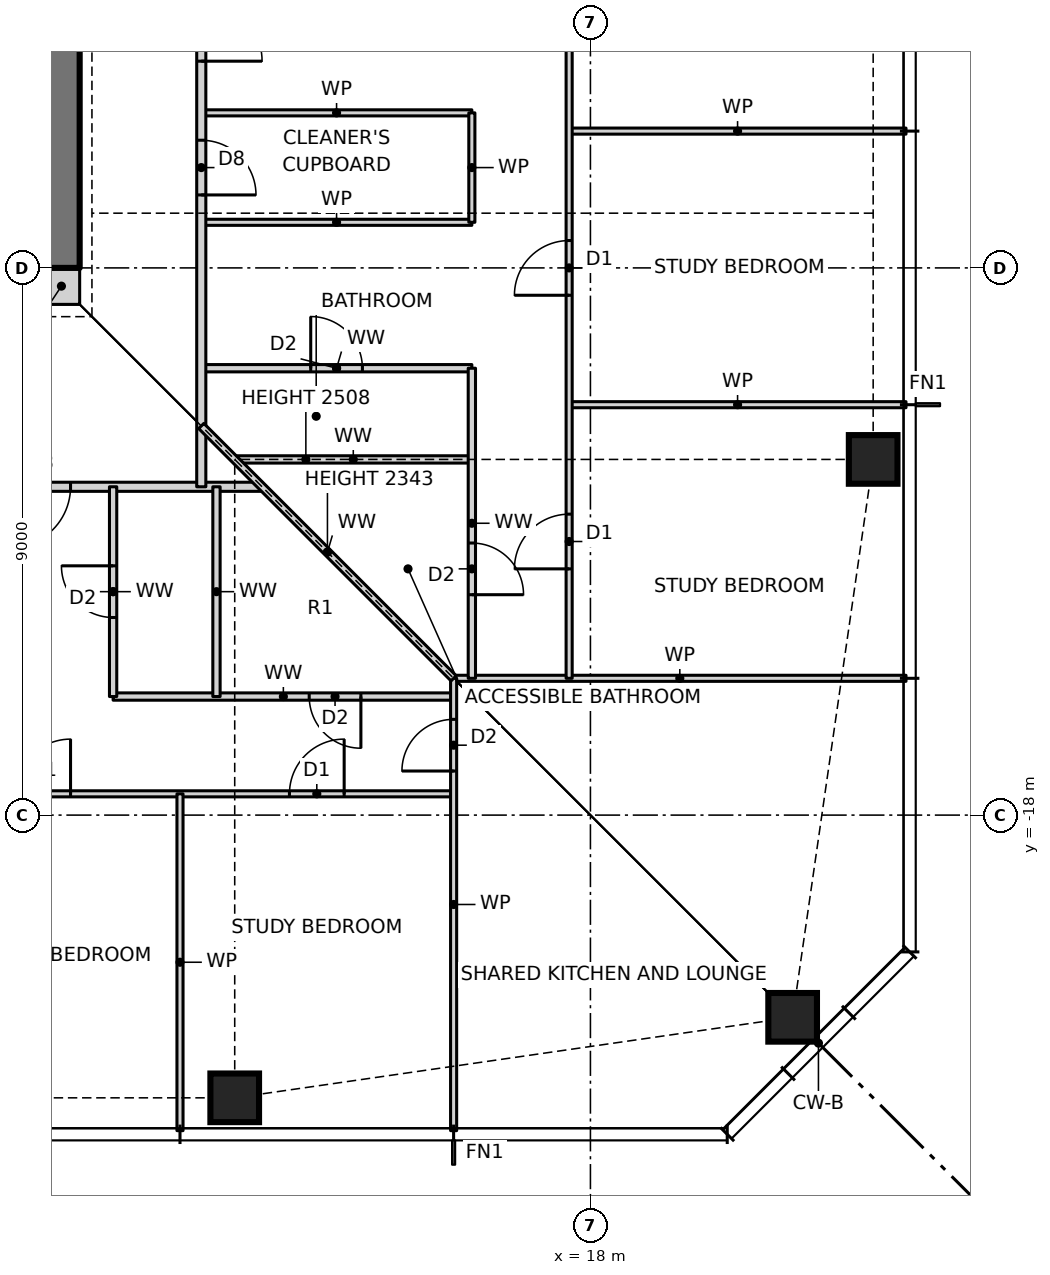
"""IFC4 building model, lengths in metres.
Left out: names, types, materials, properties, quantities, classifications, styles, units other than length and angle.
Written with IfcOpenShell. Run it as: python <this file> out.ifc"""

import sys

from ifc_helpers import new_model, si_unit, direction, frame, frame_2d, origin, origin_2d, place, context, subcontext, project, spatial, rectangle, hollow_rectangle, extrude, element, fill, save


model = new_model("IFC4")
c1 = context("Model", 3, precision=1e-05, world=origin(), true_north=direction((0.0, 1.0)))
c2 = subcontext(c1, "Body", "Model", "MODEL_VIEW")
j1 = project(units=[si_unit("LENGTHUNIT", "METRE"), si_unit("PLANEANGLEUNIT", "RADIAN")], contexts=[c1])
p1 = place(None, origin())
s1 = spatial("IfcSite", under=j1, at=p1, CompositionType="ELEMENT")
p2 = place(p1, origin())
s2 = spatial("IfcBuilding", under=s1, at=p2, CompositionType="ELEMENT")
p3 = place(p2, frame((0.0, 0.0, 22.0)))
s3 = spatial("IfcBuildingStorey", under=s2, at=p3, CompositionType="ELEMENT", Elevation=22.0)
for number, where, z_axis, x_axis in (
    (1, (12.15, -22.65, 0.0), (0.0, 0.0, 1.0), (1.0, 0.0, 0.0)),
    (2, (21.326, -21.326, 0.0), (0.0, 0.0, 1.0), (1.0, 0.0, 0.0)),
    (3, (22.65, -12.15, 0.0), (0.0, 0.0, 1.0), (1.0, 0.0, 0.0)),
):
    element("IfcColumn", number, at=place(p3, frame(where, z_axis=z_axis, x_axis=x_axis)), inside=s3, PredefinedType="COLUMN", context=c2, shape_type="SweptSolid", body=[
        extrude(hollow_rectangle(XDim=0.8, YDim=0.8, WallThickness=0.09, at=origin_2d()), origin(), (0.0, 0.0, 1.0), 3.5),
    ])
p4 = place(p3, frame((9.0, -9.3, 0.0), z_axis=(0.0, 0.0, 1.0), x_axis=(1.0, 0.0, 0.0)))
e4 = element("IfcWall", 4, at=p4, inside=s3, PredefinedType="SOLIDWALL", context=c2, shape_type="SweptSolid", body=[
    extrude(rectangle(XDim=0.6, YDim=0.6, at=frame_2d((0.3, 0.0))), origin(), (0.0, 0.0, 1.0), 3.5),
])
p5 = place(p3, frame((9.0, -9.0, 0.0), z_axis=(0.0, 0.0, 1.0), x_axis=(0.0, 1.0, 0.0)))
e5 = element("IfcWall", 5, at=p5, inside=s3, PredefinedType="SHEAR", context=c2, shape_type="SweptSolid", body=[
    extrude(rectangle(XDim=18.0, YDim=1.2, at=frame_2d((9.0, 0.0))), origin(), (0.0, 0.0, 1.0), 3.5),
])
p6 = place(p5, frame((8.5, 0.0, 0.0)))
e6 = element("IfcOpeningElement", 6, at=p6, cuts=e5, PredefinedType="OPENING", context=c2, shape_type="SweptSolid", body=[
    extrude(rectangle(XDim=1.0, YDim=2.1, at=frame_2d((0.5, 1.05))), frame((0.0, 0.61, 0.0), z_axis=(0.0, -1.0, 0.0), x_axis=(1.0, 0.0, 0.0)), (0.0, 0.0, 1.0), 1.22),
])
p7 = place(p3, frame((-15.75, -17.65, 0.0), z_axis=(0.0, 0.0, 1.0), x_axis=(1.0, 0.0, 0.0)))
e7 = element("IfcWall", 7, at=p7, inside=s3, PredefinedType="PARTITIONING", context=c2, shape_type="SweptSolid", body=[
    extrude(rectangle(XDim=31.5, YDim=0.1, at=frame_2d((15.75, 0.0))), origin(), (0.0, 0.0, 1.0), 3.27),
])
p8 = place(p7, frame((1.8, 0.0, 0.0)))
e8 = element("IfcOpeningElement", 8, at=p8, cuts=e7, PredefinedType="OPENING", context=c2, shape_type="SweptSolid", body=[
    extrude(rectangle(XDim=0.9, YDim=2.1, at=frame_2d((0.45, 1.05))), frame((0.0, 0.06, 0.0), z_axis=(0.0, -1.0, 0.0), x_axis=(1.0, 0.0, 0.0)), (0.0, 0.0, 1.0), 0.12),
])
p9 = place(p7, frame((6.3, 0.0, 0.0)))
e9 = element("IfcOpeningElement", 9, at=p9, cuts=e7, PredefinedType="OPENING", context=c2, shape_type="SweptSolid", body=[
    extrude(rectangle(XDim=0.9, YDim=2.1, at=frame_2d((0.45, 1.05))), frame((0.0, 0.06, 0.0), z_axis=(0.0, -1.0, 0.0), x_axis=(1.0, 0.0, 0.0)), (0.0, 0.0, 1.0), 0.12),
])
p10 = place(p7, frame((10.8, 0.0, 0.0)))
e10 = element("IfcOpeningElement", 10, at=p10, cuts=e7, PredefinedType="OPENING", context=c2, shape_type="SweptSolid", body=[
    extrude(rectangle(XDim=0.9, YDim=2.1, at=frame_2d((0.45, 1.05))), frame((0.0, 0.06, 0.0), z_axis=(0.0, -1.0, 0.0), x_axis=(1.0, 0.0, 0.0)), (0.0, 0.0, 1.0), 0.12),
])
p11 = place(p7, frame((15.3, 0.0, 0.0)))
e11 = element("IfcOpeningElement", 11, at=p11, cuts=e7, PredefinedType="OPENING", context=c2, shape_type="SweptSolid", body=[
    extrude(rectangle(XDim=0.9, YDim=2.1, at=frame_2d((0.45, 1.05))), frame((0.0, 0.06, 0.0), z_axis=(0.0, -1.0, 0.0), x_axis=(1.0, 0.0, 0.0)), (0.0, 0.0, 1.0), 0.12),
])
p12 = place(p7, frame((19.8, 0.0, 0.0)))
e12 = element("IfcOpeningElement", 12, at=p12, cuts=e7, PredefinedType="OPENING", context=c2, shape_type="SweptSolid", body=[
    extrude(rectangle(XDim=0.9, YDim=2.1, at=frame_2d((0.45, 1.05))), frame((0.0, 0.06, 0.0), z_axis=(0.0, -1.0, 0.0), x_axis=(1.0, 0.0, 0.0)), (0.0, 0.0, 1.0), 0.12),
])
p13 = place(p7, frame((24.3, 0.0, 0.0)))
e13 = element("IfcOpeningElement", 13, at=p13, cuts=e7, PredefinedType="OPENING", context=c2, shape_type="SweptSolid", body=[
    extrude(rectangle(XDim=0.9, YDim=2.1, at=frame_2d((0.45, 1.05))), frame((0.0, 0.06, 0.0), z_axis=(0.0, -1.0, 0.0), x_axis=(1.0, 0.0, 0.0)), (0.0, 0.0, 1.0), 0.12),
])
p14 = place(p7, frame((28.8, 0.0, 0.0)))
e14 = element("IfcOpeningElement", 14, at=p14, cuts=e7, PredefinedType="OPENING", context=c2, shape_type="SweptSolid", body=[
    extrude(rectangle(XDim=0.9, YDim=2.1, at=frame_2d((0.45, 1.05))), frame((0.0, 0.06, 0.0), z_axis=(0.0, -1.0, 0.0), x_axis=(1.0, 0.0, 0.0)), (0.0, 0.0, 1.0), 0.12),
])
p15 = place(p3, frame((10.15, -16.05, 0.0), z_axis=(0.0, 0.0, 1.0), x_axis=(1.0, 0.0, 0.0)))
e15 = element("IfcWall", 15, at=p15, inside=s3, PredefinedType="PARTITIONING", context=c2, shape_type="SweptSolid", body=[
    extrude(rectangle(XDim=5.6, YDim=0.12, at=frame_2d((2.8, 0.0))), origin(), (0.0, 0.0, 1.0), 3.27),
])
p16 = place(p15, frame((3.225, 0.0, 0.0)))
e16 = element("IfcOpeningElement", 16, at=p16, cuts=e15, PredefinedType="OPENING", context=c2, shape_type="SweptSolid", body=[
    extrude(rectangle(XDim=0.85, YDim=2.1, at=frame_2d((0.425, 1.05))), frame((0.0, 0.07, 0.0), z_axis=(0.0, -1.0, 0.0), x_axis=(1.0, 0.0, 0.0)), (0.0, 0.0, 1.0), 0.14),
])
p17 = place(p3, frame((15.75, -15.75, 0.0), z_axis=(0.0, 0.0, 1.0), x_axis=(1.0, 0.0, 0.0)))
e17 = element("IfcWall", 17, at=p17, inside=s3, PredefinedType="PARTITIONING", context=c2, shape_type="SweptSolid", body=[
    extrude(rectangle(XDim=7.44, YDim=0.1, at=frame_2d((3.72, 0.0))), origin(), (0.0, 0.0, 1.0), 3.27),
])
p18 = place(p3, frame((-12.6, -12.6, 0.0), z_axis=(0.0, 0.0, 1.0), x_axis=(1.0, 0.0, 0.0)))
e18 = element("IfcWall", 18, at=p18, inside=s3, PredefinedType="PARTITIONING", context=c2, shape_type="SweptSolid", body=[
    extrude(rectangle(XDim=25.2, YDim=0.15, at=frame_2d((12.6, 0.0))), origin(), (0.0, 0.0, 1.0), 3.27),
])
p19 = place(p18, frame((21.05, 0.0, 0.0)))
e19 = element("IfcOpeningElement", 19, at=p19, cuts=e18, PredefinedType="OPENING", context=c2, shape_type="SweptSolid", body=[
    extrude(rectangle(XDim=1.0, YDim=2.1, at=frame_2d((0.5, 1.05))), frame((0.0, 0.085, 0.0), z_axis=(0.0, -1.0, 0.0), x_axis=(1.0, 0.0, 0.0)), (0.0, 0.0, 1.0), 0.17),
])
p20 = place(p3, frame((12.15, -12.15, 0.0), z_axis=(0.0, 0.0, 1.0), x_axis=(1.0, 0.0, 0.0)))
e20 = element("IfcWall", 20, at=p20, inside=s3, PredefinedType="PARTITIONING", context=c2, shape_type="SweptSolid", body=[
    extrude(rectangle(XDim=3.9, YDim=0.12, at=frame_2d((1.95, 0.0))), origin(), (0.0, 0.0, 1.0), 2.508),
])
p21 = place(p3, frame((17.65, -11.25, 0.0), z_axis=(0.0, 0.0, 1.0), x_axis=(1.0, 0.0, 0.0)))
e21 = element("IfcWall", 21, at=p21, inside=s3, PredefinedType="PARTITIONING", context=c2, shape_type="SweptSolid", body=[
    extrude(rectangle(XDim=5.54, YDim=0.1, at=frame_2d((2.77, 0.0))), origin(), (0.0, 0.0, 1.0), 3.27),
])
p22 = place(p3, frame((11.6, -10.65, 0.0), z_axis=(0.0, 0.0, 1.0), x_axis=(1.0, 0.0, 0.0)))
e22 = element("IfcWall", 22, at=p22, inside=s3, PredefinedType="PARTITIONING", context=c2, shape_type="SweptSolid", body=[
    extrude(rectangle(XDim=4.45, YDim=0.12, at=frame_2d((2.225, 0.0))), origin(), (0.0, 0.0, 1.0), 3.27),
])
p23 = place(p22, frame((1.8, 0.0, 0.0)))
e23 = element("IfcOpeningElement", 23, at=p23, cuts=e22, PredefinedType="OPENING", context=c2, shape_type="SweptSolid", body=[
    extrude(rectangle(XDim=0.85, YDim=2.1, at=frame_2d((0.425, 1.05))), frame((0.0, 0.07, 0.0), z_axis=(0.0, -1.0, 0.0), x_axis=(1.0, 0.0, 0.0)), (0.0, 0.0, 1.0), 0.14),
])
p24 = place(p3, frame((11.6, -8.25, 0.0), z_axis=(0.0, 0.0, 1.0), x_axis=(1.0, 0.0, 0.0)))
e24 = element("IfcWall", 24, at=p24, inside=s3, PredefinedType="PARTITIONING", context=c2, shape_type="SweptSolid", body=[
    extrude(rectangle(XDim=4.45, YDim=0.1, at=frame_2d((2.225, 0.0))), origin(), (0.0, 0.0, 1.0), 3.27),
])
p25 = place(p3, frame((17.65, -6.75, 0.0), z_axis=(0.0, 0.0, 1.0), x_axis=(1.0, 0.0, 0.0)))
e25 = element("IfcWall", 25, at=p25, inside=s3, PredefinedType="PARTITIONING", context=c2, shape_type="SweptSolid", body=[
    extrude(rectangle(XDim=5.54, YDim=0.1, at=frame_2d((2.77, 0.0))), origin(), (0.0, 0.0, 1.0), 3.27),
])
p26 = place(p3, frame((11.6, -6.45, 0.0), z_axis=(0.0, 0.0, 1.0), x_axis=(1.0, 0.0, 0.0)))
e26 = element("IfcWall", 26, at=p26, inside=s3, PredefinedType="PARTITIONING", context=c2, shape_type="SweptSolid", body=[
    extrude(rectangle(XDim=4.45, YDim=0.1, at=frame_2d((2.225, 0.0))), origin(), (0.0, 0.0, 1.0), 3.27),
])
p27 = place(p3, frame((17.65, -15.75, 0.0), z_axis=(0.0, 0.0, 1.0), x_axis=(0.0, 1.0, 0.0)))
e27 = element("IfcWall", 27, at=p27, inside=s3, PredefinedType="PARTITIONING", context=c2, shape_type="SweptSolid", body=[
    extrude(rectangle(XDim=31.5, YDim=0.1, at=frame_2d((15.75, 0.0))), origin(), (0.0, 0.0, 1.0), 3.27),
])
p28 = place(p27, frame((1.8, 0.0, 0.0)))
e28 = element("IfcOpeningElement", 28, at=p28, cuts=e27, PredefinedType="OPENING", context=c2, shape_type="SweptSolid", body=[
    extrude(rectangle(XDim=0.9, YDim=2.1, at=frame_2d((0.45, 1.05))), frame((0.0, 0.06, 0.0), z_axis=(0.0, -1.0, 0.0), x_axis=(1.0, 0.0, 0.0)), (0.0, 0.0, 1.0), 0.12),
])
p29 = place(p27, frame((6.3, 0.0, 0.0)))
e29 = element("IfcOpeningElement", 29, at=p29, cuts=e27, PredefinedType="OPENING", context=c2, shape_type="SweptSolid", body=[
    extrude(rectangle(XDim=0.9, YDim=2.1, at=frame_2d((0.45, 1.05))), frame((0.0, 0.06, 0.0), z_axis=(0.0, -1.0, 0.0), x_axis=(1.0, 0.0, 0.0)), (0.0, 0.0, 1.0), 0.12),
])
p30 = place(p27, frame((10.8, 0.0, 0.0)))
e30 = element("IfcOpeningElement", 30, at=p30, cuts=e27, PredefinedType="OPENING", context=c2, shape_type="SweptSolid", body=[
    extrude(rectangle(XDim=0.9, YDim=2.1, at=frame_2d((0.45, 1.05))), frame((0.0, 0.06, 0.0), z_axis=(0.0, -1.0, 0.0), x_axis=(1.0, 0.0, 0.0)), (0.0, 0.0, 1.0), 0.12),
])
p31 = place(p27, frame((15.3, 0.0, 0.0)))
e31 = element("IfcOpeningElement", 31, at=p31, cuts=e27, PredefinedType="OPENING", context=c2, shape_type="SweptSolid", body=[
    extrude(rectangle(XDim=0.9, YDim=2.1, at=frame_2d((0.45, 1.05))), frame((0.0, 0.06, 0.0), z_axis=(0.0, -1.0, 0.0), x_axis=(1.0, 0.0, 0.0)), (0.0, 0.0, 1.0), 0.12),
])
p32 = place(p27, frame((19.8, 0.0, 0.0)))
e32 = element("IfcOpeningElement", 32, at=p32, cuts=e27, PredefinedType="OPENING", context=c2, shape_type="SweptSolid", body=[
    extrude(rectangle(XDim=0.9, YDim=2.1, at=frame_2d((0.45, 1.05))), frame((0.0, 0.06, 0.0), z_axis=(0.0, -1.0, 0.0), x_axis=(1.0, 0.0, 0.0)), (0.0, 0.0, 1.0), 0.12),
])
p33 = place(p27, frame((24.3, 0.0, 0.0)))
e33 = element("IfcOpeningElement", 33, at=p33, cuts=e27, PredefinedType="OPENING", context=c2, shape_type="SweptSolid", body=[
    extrude(rectangle(XDim=0.9, YDim=2.1, at=frame_2d((0.45, 1.05))), frame((0.0, 0.06, 0.0), z_axis=(0.0, -1.0, 0.0), x_axis=(1.0, 0.0, 0.0)), (0.0, 0.0, 1.0), 0.12),
])
p34 = place(p27, frame((28.8, 0.0, 0.0)))
e34 = element("IfcOpeningElement", 34, at=p34, cuts=e27, PredefinedType="OPENING", context=c2, shape_type="SweptSolid", body=[
    extrude(rectangle(XDim=0.9, YDim=2.1, at=frame_2d((0.45, 1.05))), frame((0.0, 0.06, 0.0), z_axis=(0.0, -1.0, 0.0), x_axis=(1.0, 0.0, 0.0)), (0.0, 0.0, 1.0), 0.12),
])
p35 = place(p3, frame((16.05, -15.75, 0.0), z_axis=(0.0, 0.0, 1.0), x_axis=(0.0, 1.0, 0.0)))
e35 = element("IfcWall", 35, at=p35, inside=s3, PredefinedType="PARTITIONING", context=c2, shape_type="SweptSolid", body=[
    extrude(rectangle(XDim=5.1, YDim=0.12, at=frame_2d((2.55, 0.0))), origin(), (0.0, 0.0, 1.0), 3.27),
])
p36 = place(p35, frame((1.375, 0.0, 0.0)))
e36 = element("IfcOpeningElement", 36, at=p36, cuts=e35, PredefinedType="OPENING", context=c2, shape_type="SweptSolid", body=[
    extrude(rectangle(XDim=0.85, YDim=2.1, at=frame_2d((0.425, 1.05))), frame((0.0, 0.07, 0.0), z_axis=(0.0, -1.0, 0.0), x_axis=(1.0, 0.0, 0.0)), (0.0, 0.0, 1.0), 0.14),
])
p37 = place(p3, frame((16.05, -8.25, 0.0), z_axis=(0.0, 0.0, 1.0), x_axis=(0.0, 1.0, 0.0)))
e37 = element("IfcWall", 37, at=p37, inside=s3, PredefinedType="PARTITIONING", context=c2, shape_type="SweptSolid", body=[
    extrude(rectangle(XDim=1.8, YDim=0.1, at=frame_2d((0.9, 0.0))), origin(), (0.0, 0.0, 1.0), 3.27),
])
p38 = place(p3, frame((15.75, -23.19, 0.0), z_axis=(0.0, 0.0, 1.0), x_axis=(0.0, 1.0, 0.0)))
e38 = element("IfcWall", 38, at=p38, inside=s3, PredefinedType="PARTITIONING", context=c2, shape_type="SweptSolid", body=[
    extrude(rectangle(XDim=7.44, YDim=0.1, at=frame_2d((3.72, 0.0))), origin(), (0.0, 0.0, 1.0), 3.27),
])
p39 = place(p38, frame((5.915, 0.0, 0.0)))
e39 = element("IfcOpeningElement", 39, at=p39, cuts=e38, PredefinedType="OPENING", context=c2, shape_type="SweptSolid", body=[
    extrude(rectangle(XDim=0.85, YDim=2.1, at=frame_2d((0.425, 1.05))), frame((0.0, 0.06, 0.0), z_axis=(0.0, -1.0, 0.0), x_axis=(1.0, 0.0, 0.0)), (0.0, 0.0, 1.0), 0.12),
])
p40 = place(p3, frame((11.85, -16.05, 0.0), z_axis=(0.0, 0.0, 1.0), x_axis=(0.0, 1.0, 0.0)))
e40 = element("IfcWall", 40, at=p40, inside=s3, PredefinedType="PARTITIONING", context=c2, shape_type="SweptSolid", body=[
    extrude(rectangle(XDim=3.45, YDim=0.12, at=frame_2d((1.725, 0.0))), origin(), (0.0, 0.0, 1.0), 3.27),
])
p41 = place(p3, frame((11.6, -12.6, 0.0), z_axis=(0.0, 0.0, 1.0), x_axis=(0.0, 1.0, 0.0)))
e41 = element("IfcWall", 41, at=p41, inside=s3, PredefinedType="PARTITIONING", context=c2, shape_type="SweptSolid", body=[
    extrude(rectangle(XDim=24.2, YDim=0.15, at=frame_2d((12.1, 0.0))), origin(), (0.0, 0.0, 1.0), 3.27),
])
p42 = place(p41, frame((7.0, 0.0, 0.0)))
e42 = element("IfcOpeningElement", 42, at=p42, cuts=e41, PredefinedType="OPENING", context=c2, shape_type="SweptSolid", body=[
    extrude(rectangle(XDim=1.0, YDim=2.1, at=frame_2d((0.5, 1.05))), frame((0.0, 0.085, 0.0), z_axis=(0.0, -1.0, 0.0), x_axis=(1.0, 0.0, 0.0)), (0.0, 0.0, 1.0), 0.17),
])
p43 = place(p41, frame((4.8, 0.0, 0.0)))
e43 = element("IfcOpeningElement", 43, at=p43, cuts=e41, PredefinedType="OPENING", context=c2, shape_type="SweptSolid", body=[
    extrude(rectangle(XDim=0.9, YDim=2.1, at=frame_2d((0.45, 1.05))), frame((0.0, 0.085, 0.0), z_axis=(0.0, -1.0, 0.0), x_axis=(1.0, 0.0, 0.0)), (0.0, 0.0, 1.0), 0.17),
])
p44 = place(p3, frame((11.25, -23.19, 0.0), z_axis=(0.0, 0.0, 1.0), x_axis=(0.0, 1.0, 0.0)))
e44 = element("IfcWall", 44, at=p44, inside=s3, PredefinedType="PARTITIONING", context=c2, shape_type="SweptSolid", body=[
    extrude(rectangle(XDim=5.54, YDim=0.1, at=frame_2d((2.77, 0.0))), origin(), (0.0, 0.0, 1.0), 3.27),
])
p45 = place(p3, frame((10.15, -16.05, 0.0), z_axis=(0.0, 0.0, 1.0), x_axis=(0.0, 1.0, 0.0)))
e45 = element("IfcWall", 45, at=p45, inside=s3, PredefinedType="PARTITIONING", context=c2, shape_type="SweptSolid", body=[
    extrude(rectangle(XDim=3.45, YDim=0.12, at=frame_2d((1.725, 0.0))), origin(), (0.0, 0.0, 1.0), 3.27),
])
p46 = place(p45, frame((1.3, 0.0, 0.0)))
e46 = element("IfcOpeningElement", 46, at=p46, cuts=e45, PredefinedType="OPENING", context=c2, shape_type="SweptSolid", body=[
    extrude(rectangle(XDim=0.85, YDim=2.1, at=frame_2d((0.425, 1.05))), frame((0.0, 0.07, 0.0), z_axis=(0.0, -1.0, 0.0), x_axis=(1.0, 0.0, 0.0)), (0.0, 0.0, 1.0), 0.14),
])
p47 = place(p3, frame((15.75, -15.75, 0.0), z_axis=(0.0, 0.0, 1.0), x_axis=(-0.707106781187, 0.707106781187, 0.0)))
e47 = element("IfcWall", 47, at=p47, inside=s3, PredefinedType="PARTITIONING", context=c2, shape_type="SweptSolid", body=[
    extrude(rectangle(XDim=5.869, YDim=0.12, at=frame_2d((2.935, 0.0))), origin(), (0.0, 0.0, 1.0), 2.343),
])
p48 = place(p13, origin())
e48 = element("IfcDoor", 48, at=p48, inside=s3, OperationType="SINGLE_SWING_RIGHT", PredefinedType="DOOR", context=c2, shape_type="SweptSolid", body=[
    extrude(rectangle(XDim=0.9, YDim=2.1, at=frame_2d((0.45, 1.05))), frame((0.0, 0.025, 0.0), z_axis=(0.0, -1.0, 0.0), x_axis=(1.0, 0.0, 0.0)), (0.0, 0.0, 1.0), 0.05),
])
fill(e13, e48)
p49 = place(p14, origin())
e49 = element("IfcDoor", 49, at=p49, inside=s3, OperationType="SINGLE_SWING_RIGHT", PredefinedType="DOOR", context=c2, shape_type="SweptSolid", body=[
    extrude(rectangle(XDim=0.9, YDim=2.1, at=frame_2d((0.45, 1.05))), frame((0.0, 0.025, 0.0), z_axis=(0.0, -1.0, 0.0), x_axis=(1.0, 0.0, 0.0)), (0.0, 0.0, 1.0), 0.05),
])
fill(e14, e49)
p50 = place(p19, frame((1.0, 0.0, 0.0), z_axis=(0.0, 0.0, 1.0), x_axis=(-1.0, 0.0, 0.0)))
e50 = element("IfcDoor", 50, at=p50, inside=s3, OperationType="SINGLE_SWING_RIGHT", PredefinedType="DOOR", context=c2, shape_type="SweptSolid", body=[
    extrude(rectangle(XDim=1.0, YDim=2.1, at=frame_2d((0.5, 1.05))), frame((0.0, 0.025, 0.0), z_axis=(0.0, -1.0, 0.0), x_axis=(1.0, 0.0, 0.0)), (0.0, 0.0, 1.0), 0.05),
])
fill(e19, e50)
p51 = place(p46, origin())
e51 = element("IfcDoor", 51, at=p51, inside=s3, OperationType="SINGLE_SWING_RIGHT", PredefinedType="DOOR", context=c2, shape_type="SweptSolid", body=[
    extrude(rectangle(XDim=0.85, YDim=2.1, at=frame_2d((0.425, 1.05))), frame((0.0, 0.025, 0.0), z_axis=(0.0, -1.0, 0.0), x_axis=(1.0, 0.0, 0.0)), (0.0, 0.0, 1.0), 0.05),
])
fill(e46, e51)
p52 = place(p16, frame((0.85, 0.0, 0.0), z_axis=(0.0, 0.0, 1.0), x_axis=(-1.0, 0.0, 0.0)))
e52 = element("IfcDoor", 52, at=p52, inside=s3, OperationType="SINGLE_SWING_LEFT", PredefinedType="DOOR", context=c2, shape_type="SweptSolid", body=[
    extrude(rectangle(XDim=0.85, YDim=2.1, at=frame_2d((0.425, 1.05))), frame((0.0, 0.025, 0.0), z_axis=(0.0, -1.0, 0.0), x_axis=(1.0, 0.0, 0.0)), (0.0, 0.0, 1.0), 0.05),
])
fill(e16, e52)
p53 = place(p28, origin())
e53 = element("IfcDoor", 53, at=p53, inside=s3, OperationType="SINGLE_SWING_LEFT", PredefinedType="DOOR", context=c2, shape_type="SweptSolid", body=[
    extrude(rectangle(XDim=0.9, YDim=2.1, at=frame_2d((0.45, 1.05))), frame((0.0, 0.025, 0.0), z_axis=(0.0, -1.0, 0.0), x_axis=(1.0, 0.0, 0.0)), (0.0, 0.0, 1.0), 0.05),
])
fill(e28, e53)
p54 = place(p29, origin())
e54 = element("IfcDoor", 54, at=p54, inside=s3, OperationType="SINGLE_SWING_LEFT", PredefinedType="DOOR", context=c2, shape_type="SweptSolid", body=[
    extrude(rectangle(XDim=0.9, YDim=2.1, at=frame_2d((0.45, 1.05))), frame((0.0, 0.025, 0.0), z_axis=(0.0, -1.0, 0.0), x_axis=(1.0, 0.0, 0.0)), (0.0, 0.0, 1.0), 0.05),
])
fill(e29, e54)
p55 = place(p42, frame((1.0, 0.0, 0.0), z_axis=(0.0, 0.0, 1.0), x_axis=(-1.0, 0.0, 0.0)))
e55 = element("IfcDoor", 55, at=p55, inside=s3, OperationType="SINGLE_SWING_RIGHT", PredefinedType="DOOR", context=c2, shape_type="SweptSolid", body=[
    extrude(rectangle(XDim=1.0, YDim=2.1, at=frame_2d((0.5, 1.05))), frame((0.0, 0.025, 0.0), z_axis=(0.0, -1.0, 0.0), x_axis=(1.0, 0.0, 0.0)), (0.0, 0.0, 1.0), 0.05),
])
fill(e42, e55)
p56 = place(p36, frame((0.85, 0.0, 0.0), z_axis=(0.0, 0.0, 1.0), x_axis=(-1.0, 0.0, 0.0)))
e56 = element("IfcDoor", 56, at=p56, inside=s3, OperationType="SINGLE_SWING_RIGHT", PredefinedType="DOOR", context=c2, shape_type="SweptSolid", body=[
    extrude(rectangle(XDim=0.85, YDim=2.1, at=frame_2d((0.425, 1.05))), frame((0.0, 0.025, 0.0), z_axis=(0.0, -1.0, 0.0), x_axis=(1.0, 0.0, 0.0)), (0.0, 0.0, 1.0), 0.05),
])
fill(e36, e56)
p57 = place(p23, origin())
e57 = element("IfcDoor", 57, at=p57, inside=s3, OperationType="SINGLE_SWING_LEFT", PredefinedType="DOOR", context=c2, shape_type="SweptSolid", body=[
    extrude(rectangle(XDim=0.85, YDim=2.1, at=frame_2d((0.425, 1.05))), frame((0.0, 0.025, 0.0), z_axis=(0.0, -1.0, 0.0), x_axis=(1.0, 0.0, 0.0)), (0.0, 0.0, 1.0), 0.05),
])
fill(e23, e57)
p58 = place(p43, frame((0.9, 0.0, 0.0), z_axis=(0.0, 0.0, 1.0), x_axis=(-1.0, 0.0, 0.0)))
e58 = element("IfcDoor", 58, at=p58, inside=s3, OperationType="SINGLE_SWING_RIGHT", PredefinedType="DOOR", context=c2, shape_type="SweptSolid", body=[
    extrude(rectangle(XDim=0.9, YDim=2.1, at=frame_2d((0.45, 1.05))), frame((0.0, 0.025, 0.0), z_axis=(0.0, -1.0, 0.0), x_axis=(1.0, 0.0, 0.0)), (0.0, 0.0, 1.0), 0.05),
])
fill(e43, e58)
p59 = place(p39, origin())
e59 = element("IfcDoor", 59, at=p59, inside=s3, OperationType="SINGLE_SWING_LEFT", PredefinedType="DOOR", context=c2, shape_type="SweptSolid", body=[
    extrude(rectangle(XDim=0.85, YDim=2.1, at=frame_2d((0.425, 1.05))), frame((0.0, 0.025, 0.0), z_axis=(0.0, -1.0, 0.0), x_axis=(1.0, 0.0, 0.0)), (0.0, 0.0, 1.0), 0.05),
])
fill(e39, e59)
save(model, sys.argv[1])
